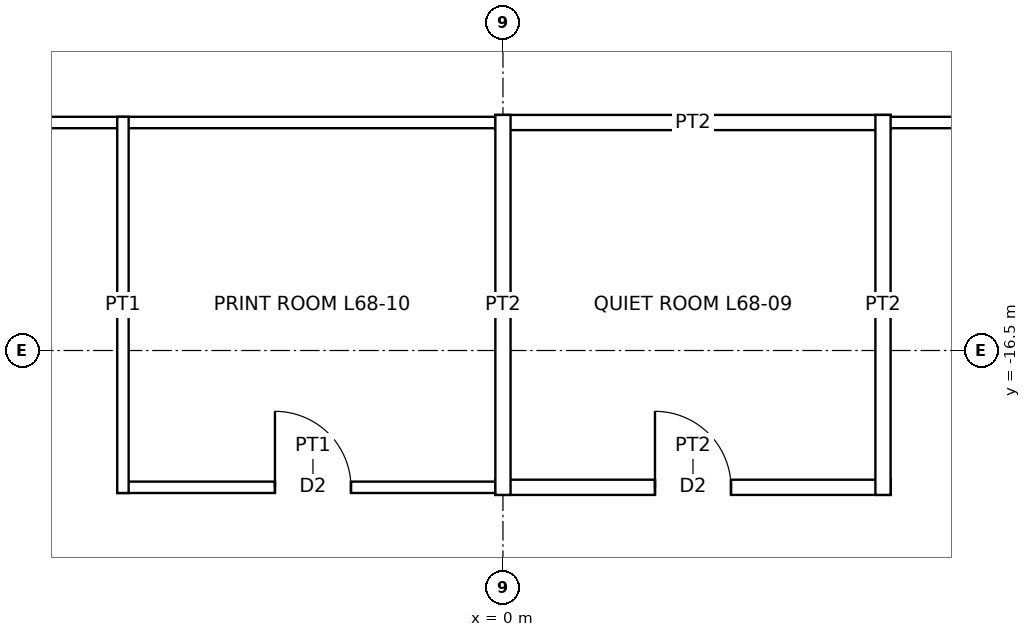
"""IFC4 building model, lengths in metres.
Left out: names, types, materials, properties, quantities, classifications, styles, units other than length and angle.
Written with IfcOpenShell. Run it as: python <this file> out.ifc"""

import sys

from ifc_helpers import new_model, si_unit, direction, frame, frame_2d, origin, place, context, subcontext, project, spatial, rectangle, extrude, element, fill, save


model = new_model("IFC4")
c1 = context("Model", 3, precision=1e-05, world=origin(), true_north=direction((0.0, 1.0)))
c2 = subcontext(c1, "Body", "Model", "MODEL_VIEW")
j1 = project(units=[si_unit("LENGTHUNIT", "METRE"), si_unit("PLANEANGLEUNIT", "RADIAN")], contexts=[c1])
p1 = place(None, origin())
s1 = spatial("IfcSite", under=j1, at=p1, CompositionType="ELEMENT")
p2 = place(p1, origin())
s2 = spatial("IfcBuilding", under=s1, at=p2, CompositionType="ELEMENT")
p3 = place(p2, frame((0.0, 0.0, 307.9)))
s3 = spatial("IfcBuildingStorey", under=s2, at=p3, CompositionType="ELEMENT", Elevation=307.9)
p4 = place(p3, frame((-5.075, -18.3, 0.0), z_axis=(0.0, 0.0, 1.0), x_axis=(1.0, 0.0, 0.0)))
e1 = element("IfcWall", 1, at=p4, inside=s3, PredefinedType="PARTITIONING", context=c2, shape_type="SweptSolid", body=[
    extrude(rectangle(XDim=5.15, YDim=0.15, at=frame_2d((2.575, 0.0))), origin(), (0.0, 0.0, 1.0), 3.85),
])
p5 = place(p4, frame((2.075, 0.0, 0.0)))
e2 = element("IfcOpeningElement", 2, at=p5, cuts=e1, PredefinedType="OPENING", context=c2, shape_type="SweptSolid", body=[
    extrude(rectangle(XDim=1.0, YDim=2.1, at=frame_2d((0.5, 1.05))), frame((0.0, 0.085, 0.0), z_axis=(0.0, -1.0, 0.0), x_axis=(1.0, 0.0, 0.0)), (0.0, 0.0, 1.0), 0.17),
])
p6 = place(p3, frame((-0.1, -18.3, 0.0), z_axis=(0.0, 0.0, 1.0), x_axis=(1.0, 0.0, 0.0)))
e3 = element("IfcWall", 3, at=p6, inside=s3, PredefinedType="PARTITIONING", context=c2, shape_type="SweptSolid", body=[
    extrude(rectangle(XDim=5.2, YDim=0.2, at=frame_2d((2.6, 0.0))), origin(), (0.0, 0.0, 1.0), 3.85),
])
p7 = place(p6, frame((2.1, 0.0, 0.0)))
e4 = element("IfcOpeningElement", 4, at=p7, cuts=e3, PredefinedType="OPENING", context=c2, shape_type="SweptSolid", body=[
    extrude(rectangle(XDim=1.0, YDim=2.1, at=frame_2d((0.5, 1.05))), frame((0.0, 0.11, 0.0), z_axis=(0.0, -1.0, 0.0), x_axis=(1.0, 0.0, 0.0)), (0.0, 0.0, 1.0), 0.22),
])
p8 = place(p3, frame((-13.575, -13.5, 0.0), z_axis=(0.0, 0.0, 1.0), x_axis=(1.0, 0.0, 0.0)))
e5 = element("IfcWall", 5, at=p8, inside=s3, PredefinedType="PARTITIONING", context=c2, shape_type="SweptSolid", body=[
    extrude(rectangle(XDim=13.65, YDim=0.15, at=frame_2d((6.825, 0.0))), origin(), (0.0, 0.0, 1.0), 3.85),
])
p9 = place(p8, frame((3.825, 0.0, 0.0)))
e6 = element("IfcOpeningElement", 6, at=p9, cuts=e5, PredefinedType="OPENING", context=c2, shape_type="SweptSolid", body=[
    extrude(rectangle(XDim=1.0, YDim=2.4, at=frame_2d((0.5, 1.2))), frame((0.0, 0.085, 0.0), z_axis=(0.0, -1.0, 0.0), x_axis=(1.0, 0.0, 0.0)), (0.0, 0.0, 1.0), 0.17),
])
p10 = place(p3, frame((-0.1, -13.5, 0.0), z_axis=(0.0, 0.0, 1.0), x_axis=(1.0, 0.0, 0.0)))
e7 = element("IfcWall", 7, at=p10, inside=s3, PredefinedType="PARTITIONING", context=c2, shape_type="SweptSolid", body=[
    extrude(rectangle(XDim=5.2, YDim=0.2, at=frame_2d((2.6, 0.0))), origin(), (0.0, 0.0, 1.0), 3.85),
])
p11 = place(p3, frame((4.925, -13.5, 0.0), z_axis=(0.0, 0.0, 1.0), x_axis=(1.0, 0.0, 0.0)))
e8 = element("IfcWall", 8, at=p11, inside=s3, PredefinedType="PARTITIONING", context=c2, shape_type="SweptSolid", body=[
    extrude(rectangle(XDim=7.15, YDim=0.15, at=frame_2d((3.575, 0.0))), origin(), (0.0, 0.0, 1.0), 3.85),
])
p12 = place(p3, frame((-5.0, -18.375, 0.0), z_axis=(0.0, 0.0, 1.0), x_axis=(0.0, 1.0, 0.0)))
e9 = element("IfcWall", 9, at=p12, inside=s3, PredefinedType="PARTITIONING", context=c2, shape_type="SweptSolid", body=[
    extrude(rectangle(XDim=4.95, YDim=0.15, at=frame_2d((2.475, 0.0))), origin(), (0.0, 0.0, 1.0), 3.85),
])
p13 = place(p3, frame((0.0, -18.4, 0.0), z_axis=(0.0, 0.0, 1.0), x_axis=(0.0, 1.0, 0.0)))
e10 = element("IfcWall", 10, at=p13, inside=s3, PredefinedType="PARTITIONING", context=c2, shape_type="SweptSolid", body=[
    extrude(rectangle(XDim=5.0, YDim=0.2, at=frame_2d((2.5, 0.0))), origin(), (0.0, 0.0, 1.0), 3.243),
])
p14 = place(p3, frame((5.0, -18.4, 0.0), z_axis=(0.0, 0.0, 1.0), x_axis=(0.0, 1.0, 0.0)))
e11 = element("IfcWall", 11, at=p14, inside=s3, PredefinedType="PARTITIONING", context=c2, shape_type="SweptSolid", body=[
    extrude(rectangle(XDim=5.0, YDim=0.2, at=frame_2d((2.5, 0.0))), origin(), (0.0, 0.0, 1.0), 3.85),
])
p15 = place(p7, origin())
e12 = element("IfcDoor", 12, at=p15, inside=s3, OperationType="SINGLE_SWING_LEFT", PredefinedType="DOOR", context=c2, shape_type="SweptSolid", body=[
    extrude(rectangle(XDim=1.0, YDim=2.1, at=frame_2d((0.5, 1.05))), frame((0.0, 0.025, 0.0), z_axis=(0.0, -1.0, 0.0), x_axis=(1.0, 0.0, 0.0)), (0.0, 0.0, 1.0), 0.05),
])
fill(e4, e12)
p16 = place(p5, origin())
e13 = element("IfcDoor", 13, at=p16, inside=s3, OperationType="SINGLE_SWING_LEFT", PredefinedType="DOOR", context=c2, shape_type="SweptSolid", body=[
    extrude(rectangle(XDim=1.0, YDim=2.1, at=frame_2d((0.5, 1.05))), frame((0.0, 0.025, 0.0), z_axis=(0.0, -1.0, 0.0), x_axis=(1.0, 0.0, 0.0)), (0.0, 0.0, 1.0), 0.05),
])
fill(e2, e13)
save(model, sys.argv[1])
